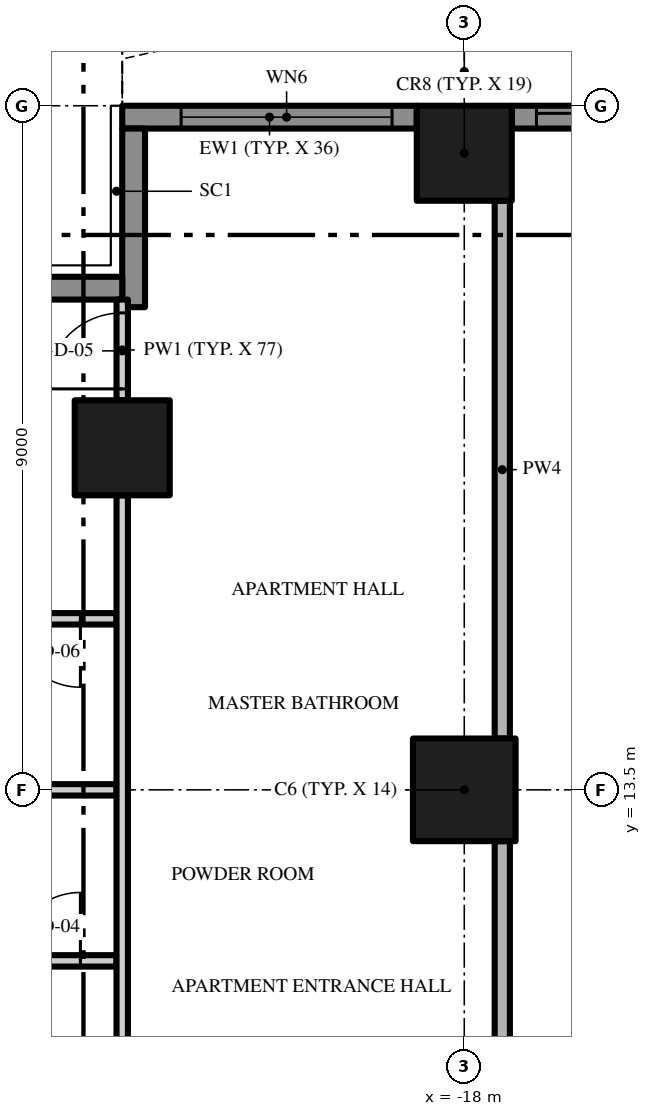
"""IFC4 building model, lengths in metres.
Left out: names, types, materials, properties, quantities, classifications, styles, units other than length and angle.
Written with IfcOpenShell. Run it as: python <this file> out.ifc"""

import sys

from ifc_helpers import new_model, si_unit, direction, frame, frame_2d, origin, origin_2d, place, context, subcontext, project, spatial, polyline, rectangle, outline, extrude, element, fill, save


model = new_model("IFC4")
c1 = context("Model", 3, precision=1e-05, world=origin(), true_north=direction((0.0, 1.0)))
c2 = subcontext(c1, "Body", "Model", "MODEL_VIEW")
j1 = project(units=[si_unit("LENGTHUNIT", "METRE"), si_unit("PLANEANGLEUNIT", "RADIAN")], contexts=[c1])
p1 = place(None, origin())
s1 = spatial("IfcSite", under=j1, at=p1, CompositionType="ELEMENT")
p2 = place(p1, origin())
s2 = spatial("IfcBuilding", under=s1, at=p2, CompositionType="ELEMENT")
p3 = place(p2, frame((0.0, 0.0, 111.2)))
s3 = spatial("IfcBuildingStorey", under=s2, at=p3, CompositionType="ELEMENT", Elevation=111.2)
p4 = place(p3, frame((-18.0, 13.5, 0.0), z_axis=(0.0, 0.0, 1.0), x_axis=(1.0, 0.0, 0.0)))
e1 = element("IfcColumn", 1, at=p4, inside=s3, PredefinedType="COLUMN", context=c2, shape_type="SweptSolid", body=[
    extrude(rectangle(XDim=1.35, YDim=1.35, at=origin_2d()), origin(), (0.0, 0.0, 1.0), 3.5),
])
for number, where, z_axis, x_axis in (
    (2, (-18.0, 21.875, 0.0), (0.0, 0.0, 1.0), (1.0, 0.0, 0.0)),
    (3, (-22.5, 18.0, 0.0), (0.0, 0.0, 1.0), (1.0, 0.0, 0.0)),
):
    element("IfcColumn", number, at=place(p3, frame(where, z_axis=z_axis, x_axis=x_axis)), inside=s3, PredefinedType="COLUMN", context=c2, shape_type="SweptSolid", body=[
        extrude(rectangle(XDim=1.25, YDim=1.25, at=origin_2d()), origin(), (0.0, 0.0, 1.0), 3.5),
    ])
p5 = place(p3, frame((-17.375, 22.35, 0.0), z_axis=(0.0, 0.0, 1.0), x_axis=(1.0, 0.0, 0.0)))
e4 = element("IfcWall", 4, at=p5, inside=s3, PredefinedType="SOLIDWALL", context=c2, shape_type="SweptSolid", body=[
    extrude(rectangle(XDim=3.875, YDim=0.3, at=frame_2d((1.938, 0.0))), origin(), (0.0, 0.0, 1.0), 3.5),
])
p6 = place(p5, frame((0.325, 0.0, 0.0)))
e5 = element("IfcOpeningElement", 5, at=p6, cuts=e4, PredefinedType="OPENING", context=c2, shape_type="SweptSolid", body=[
    extrude(rectangle(XDim=2.775, YDim=2.4, at=frame_2d((1.387, 1.2))), frame((0.0, 0.16, 0.0), z_axis=(0.0, -1.0, 0.0), x_axis=(1.0, 0.0, 0.0)), (0.0, 0.0, 1.0), 0.32),
])
p7 = place(p3, frame((-22.5, 22.35, 0.0), z_axis=(0.0, 0.0, 1.0), x_axis=(1.0, 0.0, 0.0)))
e6 = element("IfcWall", 6, at=p7, inside=s3, PredefinedType="SOLIDWALL", context=c2, shape_type="SweptSolid", body=[
    extrude(rectangle(XDim=3.875, YDim=0.3, at=frame_2d((1.938, 0.0))), origin(), (0.0, 0.0, 1.0), 3.5),
])
p8 = place(p7, frame((0.775, 0.0, 0.45)))
e7 = element("IfcOpeningElement", 7, at=p8, cuts=e6, PredefinedType="OPENING", context=c2, shape_type="SweptSolid", body=[
    extrude(rectangle(XDim=2.775, YDim=2.65, at=frame_2d((1.387, 1.325))), frame((0.0, 0.16, 0.0), z_axis=(0.0, -1.0, 0.0), x_axis=(1.0, 0.0, 0.0)), (0.0, 0.0, 1.0), 0.32),
])
p9 = place(p3, frame((-22.35, 19.85, 0.0), z_axis=(0.0, 0.0, 1.0), x_axis=(0.0, 1.0, 0.0)))
e8 = element("IfcWall", 8, at=p9, inside=s3, PredefinedType="SOLIDWALL", context=c2, shape_type="SweptSolid", body=[
    extrude(rectangle(XDim=2.35, YDim=0.3, at=frame_2d((1.175, 0.0))), origin(), (0.0, 0.0, 1.0), 3.5),
])
p10 = place(p3, frame((-24.75, 20.1, 0.0), z_axis=(0.0, 0.0, 1.0), x_axis=(1.0, 0.0, 0.0)))
e9 = element("IfcWall", 9, at=p10, inside=s3, PredefinedType="SOLIDWALL", context=c2, shape_type="SweptSolid", body=[
    extrude(rectangle(XDim=2.25, YDim=0.3, at=frame_2d((1.125, 0.0))), origin(), (0.0, 0.0, 1.0), 3.5),
])
p11 = place(p3, origin())
e10 = element("IfcWall", 10, at=p11, inside=s3, PredefinedType="USERDEFINED", context=c2, shape_type="SweptSolid", body=[
    extrude(outline(polyline([(-13.5, 25.149), (-15.0, 25.485), (-15.375, 25.5), (-16.5, 25.369), (-18.0, 24.845), (-19.5, 24.112), (-21.0, 23.451), (-22.5, 23.115), (-22.445, 22.871), (-20.921, 23.213), (-19.395, 23.885), (-17.904, 24.614), (-16.444, 25.124), (-15.365, 25.249), (-15.033, 25.236), (-13.555, 24.905), (-13.5, 25.149)])), origin(), (0.0, 0.0, 1.0), 0.9),
])
p12 = place(p3, frame((-24.45, 11.25, 0.0), z_axis=(0.0, 0.0, 1.0), x_axis=(1.0, 0.0, 0.0)))
e11 = element("IfcWall", 11, at=p12, inside=s3, PredefinedType="PARTITIONING", context=c2, shape_type="SweptSolid", body=[
    extrude(rectangle(XDim=1.875, YDim=0.15, at=frame_2d((0.938, 0.0))), origin(), (0.0, 0.0, 1.0), 3.5),
])
p13 = place(p12, frame((0.5, 0.0, 0.0)))
e12 = element("IfcOpeningElement", 12, at=p13, cuts=e11, PredefinedType="OPENING", context=c2, shape_type="SweptSolid", body=[
    extrude(rectangle(XDim=0.9, YDim=2.1, at=frame_2d((0.45, 1.05))), frame((0.0, 0.085, 0.0), z_axis=(0.0, -1.0, 0.0), x_axis=(1.0, 0.0, 0.0)), (0.0, 0.0, 1.0), 0.17),
])
p14 = place(p3, frame((-24.45, 13.5, 0.0), z_axis=(0.0, 0.0, 1.0), x_axis=(1.0, 0.0, 0.0)))
e13 = element("IfcWall", 13, at=p14, inside=s3, PredefinedType="PARTITIONING", context=c2, shape_type="SweptSolid", body=[
    extrude(rectangle(XDim=1.875, YDim=0.15, at=frame_2d((0.938, 0.0))), origin(), (0.0, 0.0, 1.0), 3.5),
])
p15 = place(p3, frame((-22.575, 15.75, 0.0), z_axis=(0.0, 0.0, 1.0), x_axis=(-1.0, 0.0, 0.0)))
e14 = element("IfcWall", 14, at=p15, inside=s3, PredefinedType="PARTITIONING", context=c2, shape_type="SweptSolid", body=[
    extrude(rectangle(XDim=1.875, YDim=0.15, at=frame_2d((0.938, 0.0))), origin(), (0.0, 0.0, 1.0), 3.5),
])
p16 = place(p15, frame((0.475, 0.0, 0.0)))
e15 = element("IfcOpeningElement", 15, at=p16, cuts=e14, PredefinedType="OPENING", context=c2, shape_type="SweptSolid", body=[
    extrude(rectangle(XDim=0.9, YDim=2.1, at=frame_2d((0.45, 1.05))), frame((0.0, 0.085, 0.0), z_axis=(0.0, -1.0, 0.0), x_axis=(1.0, 0.0, 0.0)), (0.0, 0.0, 1.0), 0.17),
])
p17 = place(p3, frame((-22.5, 0.1, 0.0), z_axis=(0.0, 0.0, 1.0), x_axis=(0.0, 1.0, 0.0)))
e16 = element("IfcWall", 16, at=p17, inside=s3, PredefinedType="PARTITIONING", context=c2, shape_type="SweptSolid", body=[
    extrude(rectangle(XDim=17.275, YDim=0.15, at=frame_2d((8.637, 0.0))), origin(), (0.0, 0.0, 1.0), 3.5),
])
p18 = place(p17, frame((1.65, 0.0, 0.0)))
e17 = element("IfcOpeningElement", 17, at=p18, cuts=e16, PredefinedType="OPENING", context=c2, shape_type="SweptSolid", body=[
    extrude(rectangle(XDim=1.0, YDim=2.4, at=frame_2d((0.5, 1.2))), frame((0.0, 0.085, 0.0), z_axis=(0.0, -1.0, 0.0), x_axis=(1.0, 0.0, 0.0)), (0.0, 0.0, 1.0), 0.17),
])
p19 = place(p17, frame((8.0, 0.0, 0.0)))
e18 = element("IfcOpeningElement", 18, at=p19, cuts=e16, PredefinedType="OPENING", context=c2, shape_type="SweptSolid", body=[
    extrude(rectangle(XDim=1.8, YDim=2.4, at=frame_2d((0.9, 1.2))), frame((0.0, 0.085, 0.0), z_axis=(0.0, -1.0, 0.0), x_axis=(1.0, 0.0, 0.0)), (0.0, 0.0, 1.0), 0.17),
])
p20 = place(p3, frame((-22.5, 18.625, 0.0), z_axis=(0.0, 0.0, 1.0), x_axis=(0.0, 1.0, 0.0)))
e19 = element("IfcWall", 19, at=p20, inside=s3, PredefinedType="PARTITIONING", context=c2, shape_type="SweptSolid", body=[
    extrude(rectangle(XDim=1.325, YDim=0.15, at=frame_2d((0.662, 0.0))), origin(), (0.0, 0.0, 1.0), 3.5),
])
p21 = place(p20, frame((0.15, 0.0, 0.0)))
e20 = element("IfcOpeningElement", 20, at=p21, cuts=e19, PredefinedType="OPENING", context=c2, shape_type="SweptSolid", body=[
    extrude(rectangle(XDim=1.0, YDim=2.4, at=frame_2d((0.5, 1.2))), frame((0.0, 0.085, 0.0), z_axis=(0.0, -1.0, 0.0), x_axis=(1.0, 0.0, 0.0)), (0.0, 0.0, 1.0), 0.17),
])
p22 = place(p3, frame((-17.5, 5.175, 0.0), z_axis=(0.0, 0.0, 1.0), x_axis=(0.0, 1.0, 0.0)))
e21 = element("IfcWall", 21, at=p22, inside=s3, PredefinedType="PARTITIONING", context=c2, shape_type="SweptSolid", body=[
    extrude(rectangle(XDim=7.65, YDim=0.2, at=frame_2d((3.825, 0.0))), origin(), (0.0, 0.0, 1.0), 3.5),
])
p23 = place(p22, frame((3.225, 0.0, 0.0)))
e22 = element("IfcOpeningElement", 22, at=p23, cuts=e21, PredefinedType="OPENING", context=c2, shape_type="SweptSolid", body=[
    extrude(rectangle(XDim=1.2, YDim=2.4, at=frame_2d((0.6, 1.2))), frame((0.0, 0.11, 0.0), z_axis=(0.0, -1.0, 0.0), x_axis=(1.0, 0.0, 0.0)), (0.0, 0.0, 1.0), 0.22),
])
p24 = place(p3, frame((-17.5, 14.175, 0.0), z_axis=(0.0, 0.0, 1.0), x_axis=(0.0, 1.0, 0.0)))
e23 = element("IfcWall", 23, at=p24, inside=s3, PredefinedType="PARTITIONING", context=c2, shape_type="SweptSolid", body=[
    extrude(rectangle(XDim=7.075, YDim=0.2, at=frame_2d((3.538, 0.0))), origin(), (0.0, 0.0, 1.0), 3.5),
])
p25 = place(p6, origin())
e24 = element("IfcDoor", 24, at=p25, inside=s3, OperationType="SINGLE_SWING_LEFT", PredefinedType="DOOR", context=c2, shape_type="SweptSolid", body=[
    extrude(rectangle(XDim=2.775, YDim=2.4, at=frame_2d((1.387, 1.2))), frame((0.0, 0.025, 0.0), z_axis=(0.0, -1.0, 0.0), x_axis=(1.0, 0.0, 0.0)), (0.0, 0.0, 1.0), 0.05),
])
fill(e5, e24)
p26 = place(p8, origin())
e25 = element("IfcWindow", 25, at=p26, inside=s3, PartitioningType="SINGLE_PANEL", PredefinedType="WINDOW", context=c2, shape_type="SweptSolid", body=[
    extrude(rectangle(XDim=2.775, YDim=2.65, at=frame_2d((1.387, 1.325))), frame((0.0, 0.03, 0.0), z_axis=(0.0, -1.0, 0.0), x_axis=(1.0, 0.0, 0.0)), (0.0, 0.0, 1.0), 0.06),
])
fill(e7, e25)
p27 = place(p13, origin())
e26 = element("IfcDoor", 26, at=p27, inside=s3, OperationType="SINGLE_SWING_RIGHT", PredefinedType="DOOR", context=c2, shape_type="SweptSolid", body=[
    extrude(rectangle(XDim=0.9, YDim=2.1, at=frame_2d((0.45, 1.05))), frame((0.0, 0.025, 0.0), z_axis=(0.0, -1.0, 0.0), x_axis=(1.0, 0.0, 0.0)), (0.0, 0.0, 1.0), 0.05),
])
fill(e12, e26)
p28 = place(p21, origin())
e27 = element("IfcDoor", 27, at=p28, inside=s3, OperationType="SINGLE_SWING_LEFT", PredefinedType="DOOR", context=c2, shape_type="SweptSolid", body=[
    extrude(rectangle(XDim=1.0, YDim=2.4, at=frame_2d((0.5, 1.2))), frame((0.0, 0.025, 0.0), z_axis=(0.0, -1.0, 0.0), x_axis=(1.0, 0.0, 0.0)), (0.0, 0.0, 1.0), 0.05),
])
fill(e20, e27)
p29 = place(p16, origin())
e28 = element("IfcDoor", 28, at=p29, inside=s3, OperationType="SINGLE_SWING_LEFT", PredefinedType="DOOR", context=c2, shape_type="SweptSolid", body=[
    extrude(rectangle(XDim=0.9, YDim=2.1, at=frame_2d((0.45, 1.05))), frame((0.0, 0.025, 0.0), z_axis=(0.0, -1.0, 0.0), x_axis=(1.0, 0.0, 0.0)), (0.0, 0.0, 1.0), 0.05),
])
fill(e15, e28)
save(model, sys.argv[1])
